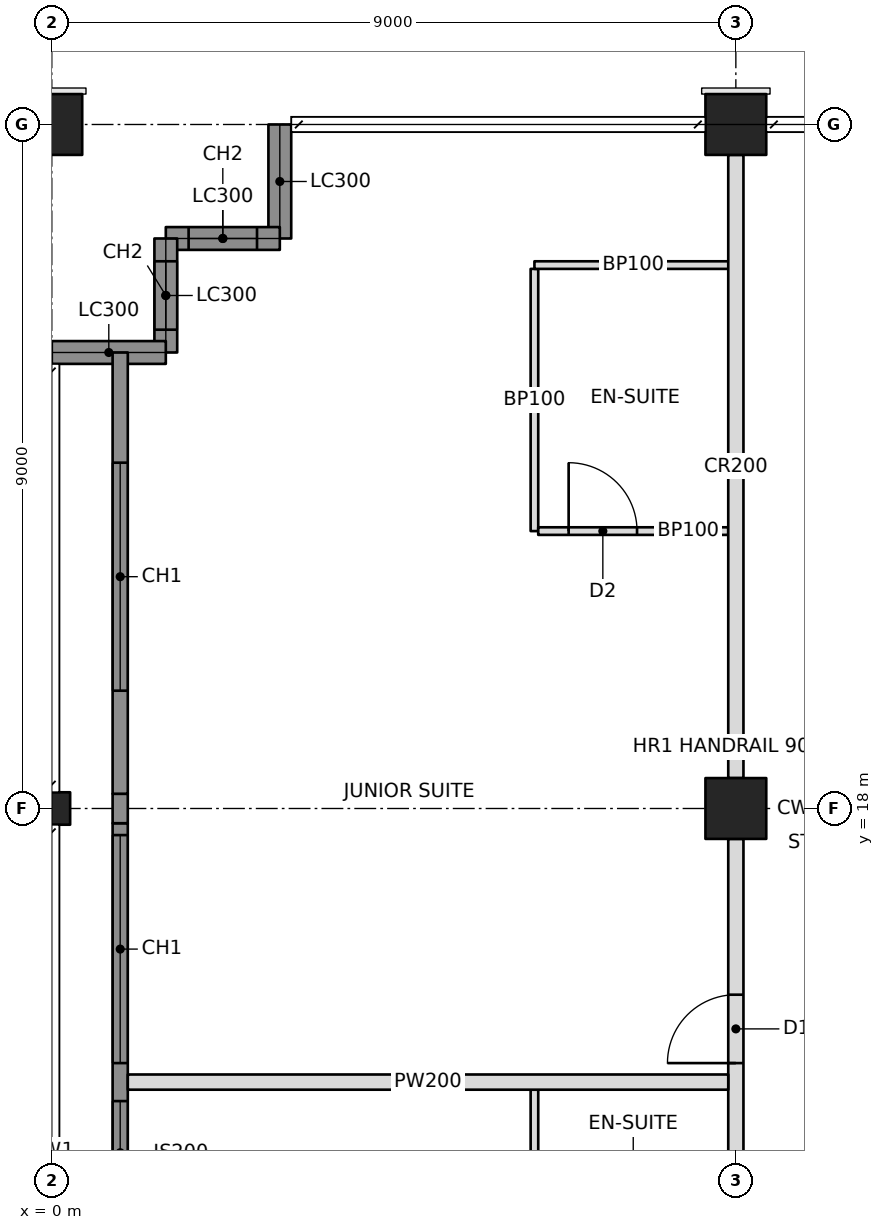
"""IFC4 building model, lengths in metres.
Left out: names, types, materials, properties, quantities, classifications, styles, units other than length and angle.
Written with IfcOpenShell. Run it as: python <this file> out.ifc"""

import sys

from ifc_helpers import new_model, si_unit, direction, frame, frame_2d, origin, origin_2d, place, context, subcontext, project, spatial, rectangle, hollow_rectangle, i_section, extrude, element, fill, save


model = new_model("IFC4")
c1 = context("Model", 3, precision=1e-05, world=origin(), true_north=direction((0.0, 1.0)))
c2 = subcontext(c1, "Body", "Model", "MODEL_VIEW")
j1 = project(units=[si_unit("LENGTHUNIT", "METRE"), si_unit("PLANEANGLEUNIT", "RADIAN")], contexts=[c1])
p1 = place(None, origin())
s1 = spatial("IfcSite", under=j1, at=p1, CompositionType="ELEMENT")
p2 = place(p1, origin())
s2 = spatial("IfcBuilding", under=s1, at=p2, CompositionType="ELEMENT")
p3 = place(p2, frame((0.0, 0.0, 214.8)))
s3 = spatial("IfcBuildingStorey", under=s2, at=p3, CompositionType="ELEMENT", Elevation=214.8)
p4 = place(p3, frame((0.0, 18.0, 0.0), z_axis=(0.0, 0.0, 1.0), x_axis=(0.0, 1.0, 0.0)))
e1 = element("IfcColumn", 1, at=p4, inside=s3, PredefinedType="COLUMN", context=c2, shape_type="SweptSolid", body=[
    extrude(i_section(OverallWidth=0.427, OverallDepth=0.483, WebThickness=0.051, FlangeThickness=0.082, at=origin_2d()), origin(), (0.0, 0.0, 1.0), 3.4),
])
p5 = place(p3, frame((0.0, 27.0, 0.0), z_axis=(0.0, 0.0, 1.0), x_axis=(0.0, 1.0, 0.0)))
e2 = element("IfcColumn", 2, at=p5, inside=s3, PredefinedType="COLUMN", context=c2, shape_type="SweptSolid", body=[
    extrude(hollow_rectangle(XDim=0.8, YDim=0.8, WallThickness=0.06, at=origin_2d()), origin(), (0.0, 0.0, 1.0), 3.4),
])
p6 = place(p3, frame((9.0, 18.0, 0.0), z_axis=(0.0, 0.0, 1.0), x_axis=(1.0, 0.0, 0.0)))
e3 = element("IfcColumn", 3, at=p6, inside=s3, PredefinedType="COLUMN", context=c2, shape_type="SweptSolid", body=[
    extrude(hollow_rectangle(XDim=0.8, YDim=0.8, WallThickness=0.05, at=origin_2d()), origin(), (0.0, 0.0, 1.0), 3.4),
])
p7 = place(p3, frame((9.0, 27.0, 0.0), z_axis=(0.0, 0.0, 1.0), x_axis=(1.0, 0.0, 0.0)))
e4 = element("IfcColumn", 4, at=p7, inside=s3, PredefinedType="COLUMN", context=c2, shape_type="SweptSolid", body=[
    extrude(hollow_rectangle(XDim=0.8, YDim=0.8, WallThickness=0.06, at=origin_2d()), origin(), (0.0, 0.0, 1.0), 3.4),
])
p8 = place(p3, frame((3.0, 27.0, 0.0), z_axis=(0.0, 0.0, 1.0), x_axis=(0.0, -1.0, 0.0)))
e5 = element("IfcWall", 5, at=p8, inside=s3, PredefinedType="SOLIDWALL", context=c2, shape_type="SweptSolid", body=[
    extrude(rectangle(XDim=1.5, YDim=0.3, at=frame_2d((0.75, 0.0))), origin(), (0.0, 0.0, 1.0), 2.42),
])
p9 = place(p3, frame((3.0, 25.5, 0.0), z_axis=(0.0, 0.0, 1.0), x_axis=(-1.0, 0.0, 0.0)))
e6 = element("IfcWall", 6, at=p9, inside=s3, PredefinedType="SOLIDWALL", context=c2, shape_type="SweptSolid", body=[
    extrude(rectangle(XDim=1.5, YDim=0.3, at=frame_2d((0.75, 0.0))), origin(), (0.0, 0.0, 1.0), 3.2),
])
p10 = place(p9, frame((0.3, 0.0, 0.6)))
e7 = element("IfcOpeningElement", 7, at=p10, cuts=e6, PredefinedType="OPENING", context=c2, shape_type="SweptSolid", body=[
    extrude(rectangle(XDim=0.9, YDim=2.2, at=frame_2d((0.45, 1.1))), frame((0.0, 0.16, 0.0), z_axis=(0.0, -1.0, 0.0), x_axis=(1.0, 0.0, 0.0)), (0.0, 0.0, 1.0), 0.32),
])
p11 = place(p3, frame((1.5, 25.5, 0.0), z_axis=(0.0, 0.0, 1.0), x_axis=(0.0, -1.0, 0.0)))
e8 = element("IfcWall", 8, at=p11, inside=s3, PredefinedType="SOLIDWALL", context=c2, shape_type="SweptSolid", body=[
    extrude(rectangle(XDim=1.5, YDim=0.3, at=frame_2d((0.75, 0.0))), origin(), (0.0, 0.0, 1.0), 3.2),
])
p12 = place(p11, frame((0.3, 0.0, 0.6)))
e9 = element("IfcOpeningElement", 9, at=p12, cuts=e8, PredefinedType="OPENING", context=c2, shape_type="SweptSolid", body=[
    extrude(rectangle(XDim=0.9, YDim=2.2, at=frame_2d((0.45, 1.1))), frame((0.0, 0.16, 0.0), z_axis=(0.0, -1.0, 0.0), x_axis=(1.0, 0.0, 0.0)), (0.0, 0.0, 1.0), 0.32),
])
p13 = place(p3, frame((1.5, 24.0, 0.0), z_axis=(0.0, 0.0, 1.0), x_axis=(-1.0, 0.0, 0.0)))
e10 = element("IfcWall", 10, at=p13, inside=s3, PredefinedType="SOLIDWALL", context=c2, shape_type="SweptSolid", body=[
    extrude(rectangle(XDim=1.5, YDim=0.3, at=frame_2d((0.75, 0.0))), origin(), (0.0, 0.0, 1.0), 2.42),
])
p14 = place(p3, frame((9.0, 10.8, 0.0), z_axis=(0.0, 0.0, 1.0), x_axis=(0.0, 1.0, 0.0)))
e11 = element("IfcWall", 11, at=p14, inside=s3, PredefinedType="PARTITIONING", context=c2, shape_type="SweptSolid", body=[
    extrude(rectangle(XDim=6.8, YDim=0.2, at=frame_2d((3.4, 0.0))), origin(), (0.0, 0.0, 1.0), 2.405),
])
p15 = place(p14, frame((0.25, 0.0, 0.0)))
e12 = element("IfcOpeningElement", 12, at=p15, cuts=e11, PredefinedType="OPENING", context=c2, shape_type="SweptSolid", body=[
    extrude(rectangle(XDim=0.9, YDim=2.1, at=frame_2d((0.45, 1.05))), frame((0.0, 0.11, 0.0), z_axis=(0.0, -1.0, 0.0), x_axis=(1.0, 0.0, 0.0)), (0.0, 0.0, 1.0), 0.22),
])
p16 = place(p14, frame((3.85, 0.0, 0.0)))
e13 = element("IfcOpeningElement", 13, at=p16, cuts=e11, PredefinedType="OPENING", context=c2, shape_type="SweptSolid", body=[
    extrude(rectangle(XDim=0.9, YDim=2.1, at=frame_2d((0.45, 1.05))), frame((0.0, 0.11, 0.0), z_axis=(0.0, -1.0, 0.0), x_axis=(1.0, 0.0, 0.0)), (0.0, 0.0, 1.0), 0.22),
])
p17 = place(p3, frame((9.0, 18.4, 0.0), z_axis=(0.0, 0.0, 1.0), x_axis=(0.0, 1.0, 0.0)))
e14 = element("IfcWall", 14, at=p17, inside=s3, PredefinedType="PARTITIONING", context=c2, shape_type="SweptSolid", body=[
    extrude(rectangle(XDim=8.2, YDim=0.2, at=frame_2d((4.1, 0.0))), origin(), (0.0, 0.0, 1.0), 2.405),
])
p18 = place(p3, frame((8.9, 14.4, 0.0), z_axis=(0.0, 0.0, 1.0), x_axis=(-1.0, 0.0, 0.0)))
e15 = element("IfcWall", 15, at=p18, inside=s3, PredefinedType="PARTITIONING", context=c2, shape_type="SweptSolid", body=[
    extrude(rectangle(XDim=7.9, YDim=0.2, at=frame_2d((3.95, 0.0))), origin(), (0.0, 0.0, 1.0), 2.404),
])
p19 = place(p3, frame((6.35, 12.25, 0.0), z_axis=(0.0, 0.0, 1.0), x_axis=(0.0, 1.0, 0.0)))
e16 = element("IfcWall", 16, at=p19, inside=s3, PredefinedType="PARTITIONING", context=c2, shape_type="SweptSolid", body=[
    extrude(rectangle(XDim=2.05, YDim=0.1, at=frame_2d((1.025, 0.0))), origin(), (0.0, 0.0, 1.0), 3.2),
])
p20 = place(p3, frame((6.35, 21.65, 0.0), z_axis=(0.0, 0.0, 1.0), x_axis=(0.0, 1.0, 0.0)))
e17 = element("IfcWall", 17, at=p20, inside=s3, PredefinedType="PARTITIONING", context=c2, shape_type="SweptSolid", body=[
    extrude(rectangle(XDim=3.45, YDim=0.1, at=frame_2d((1.725, 0.0))), origin(), (0.0, 0.0, 1.0), 3.2),
])
p21 = place(p3, frame((8.9, 21.65, 0.0), z_axis=(0.0, 0.0, 1.0), x_axis=(-1.0, 0.0, 0.0)))
e18 = element("IfcWall", 18, at=p21, inside=s3, PredefinedType="PARTITIONING", context=c2, shape_type="SweptSolid", body=[
    extrude(rectangle(XDim=2.5, YDim=0.1, at=frame_2d((1.25, 0.0))), origin(), (0.0, 0.0, 1.0), 2.404),
])
p22 = place(p21, frame((1.2, 0.0, 0.0)))
e19 = element("IfcOpeningElement", 19, at=p22, cuts=e18, PredefinedType="OPENING", context=c2, shape_type="SweptSolid", body=[
    extrude(rectangle(XDim=0.9, YDim=2.1, at=frame_2d((0.45, 1.05))), frame((0.0, 0.06, 0.0), z_axis=(0.0, -1.0, 0.0), x_axis=(1.0, 0.0, 0.0)), (0.0, 0.0, 1.0), 0.12),
])
p23 = place(p3, frame((6.35, 25.15, 0.0), z_axis=(0.0, 0.0, 1.0), x_axis=(1.0, 0.0, 0.0)))
e20 = element("IfcWall", 20, at=p23, inside=s3, PredefinedType="PARTITIONING", context=c2, shape_type="SweptSolid", body=[
    extrude(rectangle(XDim=2.6, YDim=0.1, at=frame_2d((1.3, 0.0))), origin(), (0.0, 0.0, 1.0), 2.404),
])
p24 = place(p3, frame((0.9, 9.135, 0.0), z_axis=(0.0, 0.0, 1.0), x_axis=(0.0, 1.0, 0.0)))
e21 = element("IfcWall", 21, at=p24, inside=s3, PredefinedType="SOLIDWALL", context=c2, shape_type="SweptSolid", body=[
    extrude(rectangle(XDim=8.671, YDim=0.2, at=frame_2d((4.335, 0.0))), origin(), (0.0, 0.0, 1.0), 3.2),
])
p25 = place(p24, frame((2.015, 0.0, 0.6)))
e22 = element("IfcOpeningElement", 22, at=p25, cuts=e21, PredefinedType="OPENING", context=c2, shape_type="SweptSolid", body=[
    extrude(rectangle(XDim=3.0, YDim=2.2, at=frame_2d((1.5, 1.1))), frame((0.0, 0.11, 0.0), z_axis=(0.0, -1.0, 0.0), x_axis=(1.0, 0.0, 0.0)), (0.0, 0.0, 1.0), 0.22),
])
p26 = place(p24, frame((5.515, 0.0, 0.6)))
e23 = element("IfcOpeningElement", 23, at=p26, cuts=e21, PredefinedType="OPENING", context=c2, shape_type="SweptSolid", body=[
    extrude(rectangle(XDim=3.0, YDim=2.2, at=frame_2d((1.5, 1.1))), frame((0.0, 0.11, 0.0), z_axis=(0.0, -1.0, 0.0), x_axis=(1.0, 0.0, 0.0)), (0.0, 0.0, 1.0), 0.22),
])
p27 = place(p3, frame((0.9, 17.806, 0.0), z_axis=(0.0, 0.0, 1.0), x_axis=(0.0, 1.0, 0.0)))
e24 = element("IfcWall", 24, at=p27, inside=s3, PredefinedType="SOLIDWALL", context=c2, shape_type="SweptSolid", body=[
    extrude(rectangle(XDim=0.388, YDim=0.2, at=frame_2d((0.194, 0.0))), origin(), (0.0, 0.0, 1.0), 2.404),
])
p28 = place(p3, frame((0.9, 18.194, 0.0), z_axis=(0.0, 0.0, 1.0), x_axis=(0.0, 1.0, 0.0)))
e25 = element("IfcWall", 25, at=p28, inside=s3, PredefinedType="SOLIDWALL", context=c2, shape_type="SweptSolid", body=[
    extrude(rectangle(XDim=5.806, YDim=0.2, at=frame_2d((2.903, 0.0))), origin(), (0.0, 0.0, 1.0), 3.2),
])
p29 = place(p28, frame((1.356, 0.0, 0.6)))
e26 = element("IfcOpeningElement", 26, at=p29, cuts=e25, PredefinedType="OPENING", context=c2, shape_type="SweptSolid", body=[
    extrude(rectangle(XDim=3.0, YDim=2.2, at=frame_2d((1.5, 1.1))), frame((0.0, 0.11, 0.0), z_axis=(0.0, -1.0, 0.0), x_axis=(1.0, 0.0, 0.0)), (0.0, 0.0, 1.0), 0.22),
])
p30 = place(p10, origin())
e27 = element("IfcWindow", 27, at=p30, inside=s3, PartitioningType="SINGLE_PANEL", PredefinedType="WINDOW", context=c2, shape_type="SweptSolid", body=[
    extrude(rectangle(XDim=0.9, YDim=2.2, at=frame_2d((0.45, 1.1))), frame((0.0, 0.03, 0.0), z_axis=(0.0, -1.0, 0.0), x_axis=(1.0, 0.0, 0.0)), (0.0, 0.0, 1.0), 0.06),
])
fill(e7, e27)
p31 = place(p12, origin())
e28 = element("IfcWindow", 28, at=p31, inside=s3, PartitioningType="SINGLE_PANEL", PredefinedType="WINDOW", context=c2, shape_type="SweptSolid", body=[
    extrude(rectangle(XDim=0.9, YDim=2.2, at=frame_2d((0.45, 1.1))), frame((0.0, 0.03, 0.0), z_axis=(0.0, -1.0, 0.0), x_axis=(1.0, 0.0, 0.0)), (0.0, 0.0, 1.0), 0.06),
])
fill(e9, e28)
p32 = place(p25, origin())
e29 = element("IfcWindow", 29, at=p32, inside=s3, PartitioningType="TRIPLE_PANEL_VERTICAL", PredefinedType="WINDOW", context=c2, shape_type="SweptSolid", body=[
    extrude(rectangle(XDim=3.0, YDim=2.2, at=frame_2d((1.5, 1.1))), frame((0.0, 0.03, 0.0), z_axis=(0.0, -1.0, 0.0), x_axis=(1.0, 0.0, 0.0)), (0.0, 0.0, 1.0), 0.06),
])
fill(e22, e29)
p33 = place(p26, origin())
e30 = element("IfcWindow", 30, at=p33, inside=s3, PartitioningType="TRIPLE_PANEL_VERTICAL", PredefinedType="WINDOW", context=c2, shape_type="SweptSolid", body=[
    extrude(rectangle(XDim=3.0, YDim=2.2, at=frame_2d((1.5, 1.1))), frame((0.0, 0.03, 0.0), z_axis=(0.0, -1.0, 0.0), x_axis=(1.0, 0.0, 0.0)), (0.0, 0.0, 1.0), 0.06),
])
fill(e23, e30)
p34 = place(p29, origin())
e31 = element("IfcWindow", 31, at=p34, inside=s3, PartitioningType="TRIPLE_PANEL_VERTICAL", PredefinedType="WINDOW", context=c2, shape_type="SweptSolid", body=[
    extrude(rectangle(XDim=3.0, YDim=2.2, at=frame_2d((1.5, 1.1))), frame((0.0, 0.03, 0.0), z_axis=(0.0, -1.0, 0.0), x_axis=(1.0, 0.0, 0.0)), (0.0, 0.0, 1.0), 0.06),
])
fill(e26, e31)
p35 = place(p22, frame((0.9, 0.0, 0.0), z_axis=(0.0, 0.0, 1.0), x_axis=(-1.0, 0.0, 0.0)))
e32 = element("IfcDoor", 32, at=p35, inside=s3, OperationType="SINGLE_SWING_LEFT", PredefinedType="DOOR", context=c2, shape_type="SweptSolid", body=[
    extrude(rectangle(XDim=0.9, YDim=2.1, at=frame_2d((0.45, 1.05))), frame((0.0, 0.025, 0.0), z_axis=(0.0, -1.0, 0.0), x_axis=(1.0, 0.0, 0.0)), (0.0, 0.0, 1.0), 0.05),
])
fill(e19, e32)
p36 = place(p16, origin())
e33 = element("IfcDoor", 33, at=p36, inside=s3, OperationType="SINGLE_SWING_LEFT", PredefinedType="DOOR", context=c2, shape_type="SweptSolid", body=[
    extrude(rectangle(XDim=0.9, YDim=2.1, at=frame_2d((0.45, 1.05))), frame((0.0, 0.025, 0.0), z_axis=(0.0, -1.0, 0.0), x_axis=(1.0, 0.0, 0.0)), (0.0, 0.0, 1.0), 0.05),
])
fill(e13, e33)
save(model, sys.argv[1])
